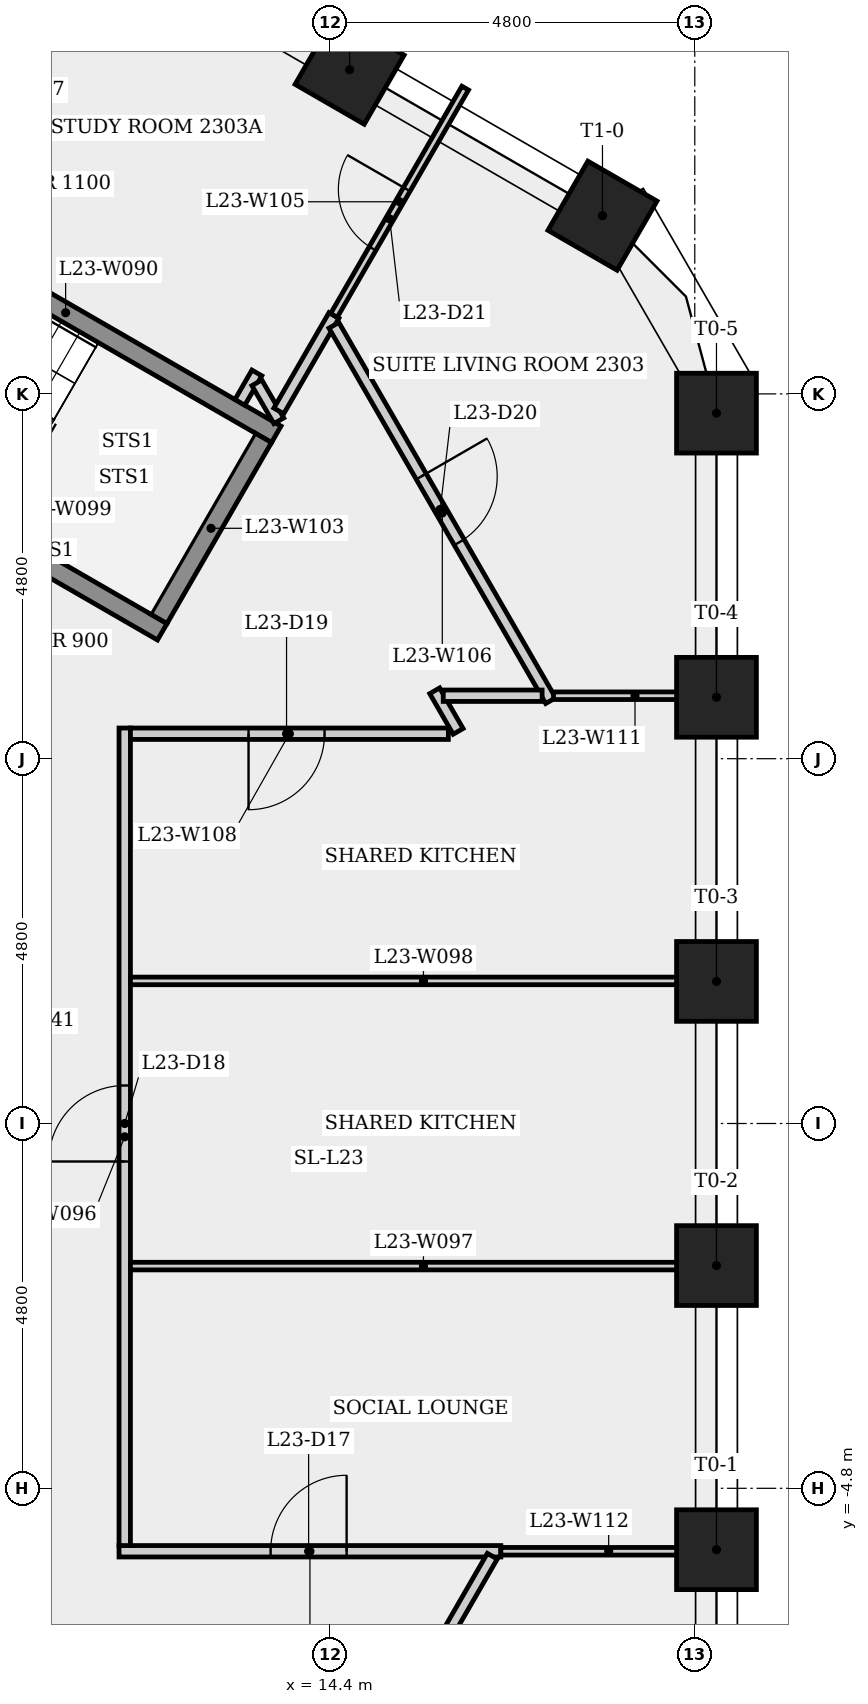
"""IFC4 building model, lengths in metres.
Left out: names, types, materials, properties, quantities, classifications, styles, units other than length and angle.
Written with IfcOpenShell. Run it as: python <this file> out.ifc"""

import sys

from ifc_helpers import new_model, si_unit, direction, frame, frame_2d, origin, origin_2d, place, context, subcontext, project, spatial, rectangle, extrude, element, fill, save


model = new_model("IFC4")
c1 = context("Model", 3, precision=1e-05, world=origin(), true_north=direction((0.0, 1.0)))
c2 = subcontext(c1, "Body", "Model", "MODEL_VIEW")
j1 = project(units=[si_unit("LENGTHUNIT", "METRE"), si_unit("PLANEANGLEUNIT", "RADIAN")], contexts=[c1])
p1 = place(None, origin())
s1 = spatial("IfcSite", under=j1, at=p1, CompositionType="ELEMENT")
p2 = place(p1, origin())
s2 = spatial("IfcBuilding", under=s1, at=p2, CompositionType="ELEMENT")
p3 = place(p2, frame((0.0, 0.0, 89.9)))
s3 = spatial("IfcBuildingStorey", under=s2, at=p3, CompositionType="ELEMENT", Elevation=89.9)
for number, where, z_axis, x_axis in (
    (1, (19.486, -5.608, 0.0), (0.0, 0.0, 1.0), (1.0, 0.0, 0.0)),
    (2, (19.486, -1.869, 0.0), (0.0, 0.0, 1.0), (1.0, 0.0, 0.0)),
    (3, (19.486, 1.869, 0.0), (0.0, 0.0, 1.0), (1.0, 0.0, 0.0)),
    (4, (19.486, 5.608, 0.0), (0.0, 0.0, 1.0), (1.0, 0.0, 0.0)),
    (5, (19.486, 9.347, 0.0), (0.0, 0.0, 1.0), (1.0, 0.0, 0.0)),
    (6, (17.986, 11.945, 0.0), (0.0, 0.0, 1.0), (0.5, 0.866, 0.0)),
    (7, (14.659, 13.865, 0.0), (0.0, 0.0, 1.0), (0.5, 0.866, 0.0)),
):
    element("IfcColumn", number, at=place(p3, frame(where, z_axis=z_axis, x_axis=x_axis)), inside=s3, PredefinedType="COLUMN", context=c2, shape_type="SweptSolid", body=[
        extrude(rectangle(XDim=1.05, YDim=1.05, at=origin_2d()), origin(), (0.0, 0.0, 1.0), 3.4),
    ])
p4 = place(p3, frame((8.151, 12.268, 0.0), z_axis=(0.0, 0.0, 1.0), x_axis=(0.866025499775, -0.499999833739, 0.0)))
e8 = element("IfcWall", 8, at=p4, inside=s3, PredefinedType="SHEAR", context=c2, shape_type="SweptSolid", body=[
    extrude(rectangle(XDim=6.4, YDim=0.25, at=frame_2d((3.2, 0.0))), origin(), (0.0, 0.0, 1.0), 3.05),
])
p5 = place(p3, frame((11.625, -5.628, 0.0), z_axis=(0.0, 0.0, 1.0), x_axis=(1.0, 0.0, 0.0)))
e9 = element("IfcWall", 9, at=p5, inside=s3, PredefinedType="PARTITIONING", context=c2, shape_type="SweptSolid", body=[
    extrude(rectangle(XDim=5.023, YDim=0.15, at=frame_2d((2.512, 0.0))), origin(), (0.0, 0.0, 1.0), 3.05),
])
p6 = place(p5, frame((1.994, 0.0, 0.0)))
e10 = element("IfcOpeningElement", 10, at=p6, cuts=e9, PredefinedType="OPENING", context=c2, shape_type="SweptSolid", body=[
    extrude(rectangle(XDim=1.0, YDim=2.1, at=frame_2d((0.5, 1.05))), frame((0.0, 0.085, 0.0), z_axis=(0.0, -1.0, 0.0), x_axis=(1.0, 0.0, 0.0)), (0.0, 0.0, 1.0), 0.17),
])
p7 = place(p3, frame((11.7, -5.553, 0.0), z_axis=(0.0, 0.0, 1.0), x_axis=(0.0, 1.0, 0.0)))
e11 = element("IfcWall", 11, at=p7, inside=s3, PredefinedType="PARTITIONING", context=c2, shape_type="SweptSolid", body=[
    extrude(rectangle(XDim=10.757, YDim=0.15, at=frame_2d((5.378, 0.0))), origin(), (0.0, 0.0, 1.0), 3.05),
])
p8 = place(p7, frame((5.053, 0.0, 0.0)))
e12 = element("IfcOpeningElement", 12, at=p8, cuts=e11, PredefinedType="OPENING", context=c2, shape_type="SweptSolid", body=[
    extrude(rectangle(XDim=1.0, YDim=2.1, at=frame_2d((0.5, 1.05))), frame((0.0, 0.085, 0.0), z_axis=(0.0, -1.0, 0.0), x_axis=(1.0, 0.0, 0.0)), (0.0, 0.0, 1.0), 0.17),
])
for number, where, z_axis, x_axis in (
    (13, (11.775, -1.876, 0.0), (0.0, 0.0, 1.0), (1.0, 0.0, 0.0)),
    (14, (11.775, 1.876, 0.0), (0.0, 0.0, 1.0), (1.0, 0.0, 0.0)),
):
    element("IfcWall", number, at=place(p3, frame(where, z_axis=z_axis, x_axis=x_axis)), inside=s3, PredefinedType="PARTITIONING", context=c2, shape_type="SweptSolid", body=[
        extrude(rectangle(XDim=7.711, YDim=0.1, at=frame_2d((3.855, 0.0))), origin(), (0.0, 0.0, 1.0), 3.05),
    ])
p9 = place(p3, frame((12.194, 6.47, 0.0), z_axis=(0.0, 0.0, 1.0), x_axis=(-0.866025499775, 0.499999833739, 0.0)))
e15 = element("IfcWall", 15, at=p9, inside=s3, PredefinedType="SHEAR", context=c2, shape_type="SweptSolid", body=[
    extrude(rectangle(XDim=6.4, YDim=0.25, at=frame_2d((3.2, 0.0))), origin(), (0.0, 0.0, 1.0), 3.05),
])
p10 = place(p9, frame((5.25, 0.0, 0.0)))
e16 = element("IfcOpeningElement", 16, at=p10, cuts=e15, PredefinedType="OPENING", context=c2, shape_type="SweptSolid", body=[
    extrude(rectangle(XDim=1.0, YDim=2.1, at=frame_2d((0.5, 1.05))), frame((0.0, 0.135, 0.0), z_axis=(0.0, -1.0, 0.0), x_axis=(1.0, 0.0, 0.0)), (0.0, 0.0, 1.0), 0.27),
])
p11 = place(p3, frame((13.215, 9.489, 0.0), z_axis=(0.0, 0.0, 1.0), x_axis=(0.500132045864, 0.865949153646, 0.0)))
e17 = element("IfcWall", 17, at=p11, inside=s3, PredefinedType="PARTITIONING", context=c2, shape_type="SweptSolid", body=[
    extrude(rectangle(XDim=0.447, YDim=0.15, at=frame_2d((0.224, 0.0))), origin(), (0.0, 0.0, 1.0), 3.05),
])
p12 = place(p3, frame((13.438, 9.746, 0.0), z_axis=(0.0, 0.0, 1.0), x_axis=(0.499868889286, -0.866101087359, 0.0)))
e18 = element("IfcWall", 18, at=p12, inside=s3, PredefinedType="PARTITIONING", context=c2, shape_type="SweptSolid", body=[
    extrude(rectangle(XDim=0.577, YDim=0.15, at=frame_2d((0.289, 0.0))), origin(), (0.0, 0.0, 1.0), 3.05),
])
p13 = place(p3, frame((13.523, 9.022, 0.0), z_axis=(0.0, 0.0, 1.0), x_axis=(-0.500034990121, -0.866005201286, 0.0)))
e19 = element("IfcWall", 19, at=p13, inside=s3, PredefinedType="SHEAR", context=c2, shape_type="SweptSolid", body=[
    extrude(rectangle(XDim=2.75, YDim=0.25, at=frame_2d((1.375, 0.0))), origin(), (0.0, 0.0, 1.0), 3.05),
])
p14 = place(p3, frame((13.727, 9.376, 0.0), z_axis=(0.0, 0.0, 1.0), x_axis=(0.499994385119, 0.866028645513, 0.0)))
e20 = element("IfcWall", 20, at=p14, inside=s3, PredefinedType="PARTITIONING", context=c2, shape_type="SweptSolid", body=[
    extrude(rectangle(XDim=1.451, YDim=0.15, at=frame_2d((0.725, 0.0))), origin(), (0.0, 0.0, 1.0), 3.05),
])
p15 = place(p3, frame((14.452, 10.632, 0.0), z_axis=(0.0, 0.0, 1.0), x_axis=(0.499993736042, 0.866029020252, 0.0)))
e21 = element("IfcWall", 21, at=p15, inside=s3, PredefinedType="PARTITIONING", context=c2, shape_type="SweptSolid", body=[
    extrude(rectangle(XDim=3.454, YDim=0.1, at=frame_2d((1.727, 0.0))), origin(), (0.0, 0.0, 1.0), 3.05),
])
p16 = place(p15, frame((1.016, 0.0, 0.0)))
e22 = element("IfcOpeningElement", 22, at=p16, cuts=e21, PredefinedType="OPENING", context=c2, shape_type="SweptSolid", body=[
    extrude(rectangle(XDim=0.9, YDim=2.1, at=frame_2d((0.45, 1.05))), frame((0.0, 0.06, 0.0), z_axis=(0.0, -1.0, 0.0), x_axis=(1.0, 0.0, 0.0)), (0.0, 0.0, 1.0), 0.12),
])
p17 = place(p3, frame((14.452, 10.502, 0.0), z_axis=(0.0, 0.0, 1.0), x_axis=(0.500025088952, -0.866010918186, 0.0)))
e23 = element("IfcWall", 23, at=p17, inside=s3, PredefinedType="PARTITIONING", context=c2, shape_type="SweptSolid", body=[
    extrude(rectangle(XDim=5.703, YDim=0.15, at=frame_2d((2.852, 0.0))), origin(), (0.0, 0.0, 1.0), 3.05),
])
p18 = place(p17, frame((2.297, 0.0, 0.0)))
e24 = element("IfcOpeningElement", 24, at=p18, cuts=e23, PredefinedType="OPENING", context=c2, shape_type="SweptSolid", body=[
    extrude(rectangle(XDim=1.0, YDim=2.1, at=frame_2d((0.5, 1.05))), frame((0.0, 0.085, 0.0), z_axis=(0.0, -1.0, 0.0), x_axis=(1.0, 0.0, 0.0)), (0.0, 0.0, 1.0), 0.17),
])
p19 = place(p3, frame((15.778, 5.694, 0.0), z_axis=(0.0, 0.0, 1.0), x_axis=(0.499928040405, -0.86606694569, 0.0)))
e25 = element("IfcWall", 25, at=p19, inside=s3, PredefinedType="PARTITIONING", context=c2, shape_type="SweptSolid", body=[
    extrude(rectangle(XDim=0.617, YDim=0.15, at=frame_2d((0.308, 0.0))), origin(), (0.0, 0.0, 1.0), 3.05),
])
p20 = place(p3, frame((15.958, 5.128, 0.0), z_axis=(0.0, 0.0, 1.0), x_axis=(-1.0, 0.0, 0.0)))
e26 = element("IfcWall", 26, at=p20, inside=s3, PredefinedType="PARTITIONING", context=c2, shape_type="SweptSolid", body=[
    extrude(rectangle(XDim=4.183, YDim=0.15, at=frame_2d((2.092, 0.0))), origin(), (0.0, 0.0, 1.0), 3.05),
])
p21 = place(p20, frame((1.629, 0.0, 0.0)))
e27 = element("IfcOpeningElement", 27, at=p21, cuts=e26, PredefinedType="OPENING", context=c2, shape_type="SweptSolid", body=[
    extrude(rectangle(XDim=1.0, YDim=2.1, at=frame_2d((0.5, 1.05))), frame((0.0, 0.085, 0.0), z_axis=(0.0, -1.0, 0.0), x_axis=(1.0, 0.0, 0.0)), (0.0, 0.0, 1.0), 0.17),
])
p22 = place(p3, frame((16.536, -5.694, 0.0), z_axis=(0.0, 0.0, 1.0), x_axis=(-0.49999073022, -0.866030755628, 0.0)))
e28 = element("IfcWall", 28, at=p22, inside=s3, PredefinedType="PARTITIONING", context=c2, shape_type="SweptSolid", body=[
    extrude(rectangle(XDim=8.324, YDim=0.15, at=frame_2d((4.162, 0.0))), origin(), (0.0, 0.0, 1.0), 3.05),
])
p23 = place(p22, frame((3.662, 0.0, 0.0)))
e29 = element("IfcOpeningElement", 29, at=p23, cuts=e28, PredefinedType="OPENING", context=c2, shape_type="SweptSolid", body=[
    extrude(rectangle(XDim=1.0, YDim=2.1, at=frame_2d((0.5, 1.05))), frame((0.0, 0.085, 0.0), z_axis=(0.0, -1.0, 0.0), x_axis=(1.0, 0.0, 0.0)), (0.0, 0.0, 1.0), 0.17),
])
p24 = place(p3, frame((17.191, 5.628, 0.0), z_axis=(0.0, 0.0, 1.0), x_axis=(-1.0, 0.0, 0.0)))
e30 = element("IfcWall", 30, at=p24, inside=s3, PredefinedType="PARTITIONING", context=c2, shape_type="SweptSolid", body=[
    extrude(rectangle(XDim=1.301, YDim=0.15, at=frame_2d((0.65, 0.0))), origin(), (0.0, 0.0, 1.0), 3.05),
])
p25 = place(p3, frame((17.341, 5.628, 0.0), z_axis=(0.0, 0.0, 1.0), x_axis=(1.0, 0.0, 0.0)))
e31 = element("IfcWall", 31, at=p25, inside=s3, PredefinedType="PARTITIONING", context=c2, shape_type="SweptSolid", body=[
    extrude(rectangle(XDim=2.144, YDim=0.1, at=frame_2d((1.072, 0.0))), origin(), (0.0, 0.0, 1.0), 3.05),
])
p26 = place(p3, frame((19.486, -5.628, 0.0), z_axis=(0.0, 0.0, 1.0), x_axis=(-1.0, 0.0, 0.0)))
e32 = element("IfcWall", 32, at=p26, inside=s3, PredefinedType="PARTITIONING", context=c2, shape_type="SweptSolid", body=[
    extrude(rectangle(XDim=2.837, YDim=0.1, at=frame_2d((1.418, 0.0))), origin(), (0.0, 0.0, 1.0), 3.05),
])
p27 = place(p6, origin())
e33 = element("IfcDoor", 33, at=p27, inside=s3, OperationType="SINGLE_SWING_RIGHT", PredefinedType="DOOR", context=c2, shape_type="SweptSolid", body=[
    extrude(rectangle(XDim=1.0, YDim=2.1, at=frame_2d((0.5, 1.05))), frame((0.0, 0.025, 0.0), z_axis=(0.0, -1.0, 0.0), x_axis=(1.0, 0.0, 0.0)), (0.0, 0.0, 1.0), 0.05),
])
fill(e10, e33)
p28 = place(p8, origin())
e34 = element("IfcDoor", 34, at=p28, inside=s3, OperationType="SINGLE_SWING_LEFT", PredefinedType="DOOR", context=c2, shape_type="SweptSolid", body=[
    extrude(rectangle(XDim=1.0, YDim=2.1, at=frame_2d((0.5, 1.05))), frame((0.0, 0.025, 0.0), z_axis=(0.0, -1.0, 0.0), x_axis=(1.0, 0.0, 0.0)), (0.0, 0.0, 1.0), 0.05),
])
fill(e12, e34)
p29 = place(p21, origin())
e35 = element("IfcDoor", 35, at=p29, inside=s3, OperationType="SINGLE_SWING_RIGHT", PredefinedType="DOOR", context=c2, shape_type="SweptSolid", body=[
    extrude(rectangle(XDim=1.0, YDim=2.1, at=frame_2d((0.5, 1.05))), frame((0.0, 0.025, 0.0), z_axis=(0.0, -1.0, 0.0), x_axis=(1.0, 0.0, 0.0)), (0.0, 0.0, 1.0), 0.05),
])
fill(e27, e35)
p30 = place(p18, origin())
e36 = element("IfcDoor", 36, at=p30, inside=s3, OperationType="SINGLE_SWING_LEFT", PredefinedType="DOOR", context=c2, shape_type="SweptSolid", body=[
    extrude(rectangle(XDim=1.0, YDim=2.1, at=frame_2d((0.5, 1.05))), frame((0.0, 0.025, 0.0), z_axis=(0.0, -1.0, 0.0), x_axis=(1.0, 0.0, 0.0)), (0.0, 0.0, 1.0), 0.05),
])
fill(e24, e36)
p31 = place(p16, origin())
e37 = element("IfcDoor", 37, at=p31, inside=s3, OperationType="SINGLE_SWING_RIGHT", PredefinedType="DOOR", context=c2, shape_type="SweptSolid", body=[
    extrude(rectangle(XDim=0.9, YDim=2.1, at=frame_2d((0.45, 1.05))), frame((0.0, 0.025, 0.0), z_axis=(0.0, -1.0, 0.0), x_axis=(1.0, 0.0, 0.0)), (0.0, 0.0, 1.0), 0.05),
])
fill(e22, e37)
save(model, sys.argv[1])
